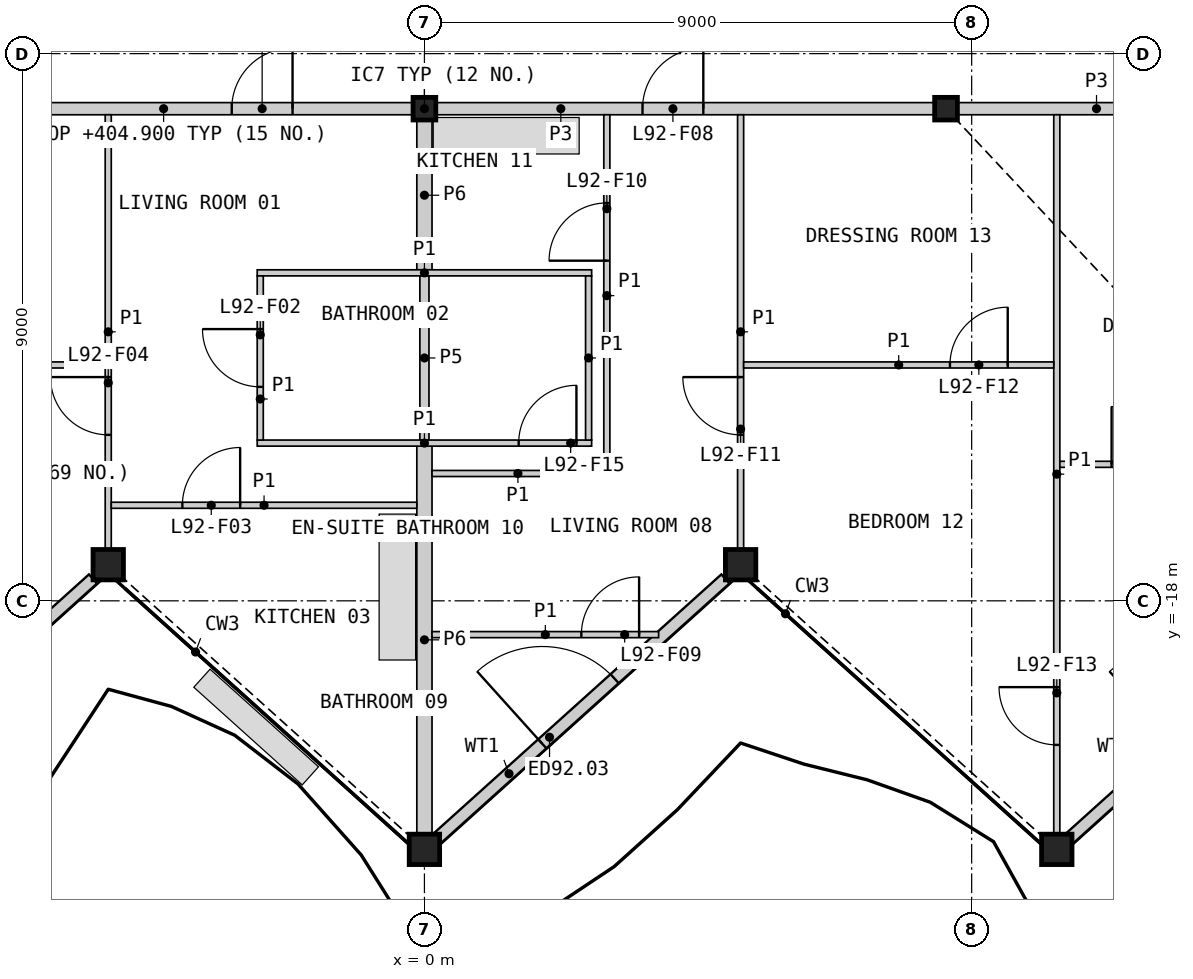
"""IFC4 building model, lengths in metres.
Left out: names, types, materials, properties, quantities, classifications, styles, units other than length and angle.
Written with IfcOpenShell. Run it as: python <this file> out.ifc"""

import sys

from ifc_helpers import new_model, si_unit, direction, frame, frame_2d, origin, origin_2d, place, context, subcontext, project, spatial, rectangle, hollow_rectangle, i_section, extrude, element, fill, save


model = new_model("IFC4")
c1 = context("Model", 3, precision=1e-05, world=origin(), true_north=direction((0.0, 1.0)))
c2 = subcontext(c1, "Body", "Model", "MODEL_VIEW")
j1 = project(units=[si_unit("LENGTHUNIT", "METRE"), si_unit("PLANEANGLEUNIT", "RADIAN")], contexts=[c1])
p1 = place(None, origin())
s1 = spatial("IfcSite", under=j1, at=p1, CompositionType="ELEMENT")
p2 = place(p1, origin())
s2 = spatial("IfcBuilding", under=s1, at=p2, CompositionType="ELEMENT")
p3 = place(p2, frame((0.0, 0.0, 401.8)))
s3 = spatial("IfcBuildingStorey", under=s2, at=p3, CompositionType="ELEMENT", Elevation=401.8)
for number, where, z_axis, x_axis in (
    (1, (-5.2, -17.406, 0.0), (0.0, 0.0, 1.0), (1.0, 0.0, 0.0)),
    (2, (0.0, -22.088, 0.0), (0.0, 0.0, 1.0), (1.0, 0.0, 0.0)),
    (3, (5.2, -17.406, 0.0), (0.0, 0.0, 1.0), (1.0, 0.0, 0.0)),
    (4, (10.4, -22.088, 0.0), (0.0, 0.0, 1.0), (1.0, 0.0, 0.0)),
):
    element("IfcColumn", number, at=place(p3, frame(where, z_axis=z_axis, x_axis=x_axis)), inside=s3, PredefinedType="COLUMN", context=c2, shape_type="SweptSolid", body=[
        extrude(hollow_rectangle(XDim=0.5, YDim=0.5, WallThickness=0.03, at=origin_2d()), origin(), (0.0, 0.0, 1.0), 3.4),
    ])
for number, where, z_axis, x_axis in (
    (5, (0.0, -9.906, 0.0), (0.0, 0.0, 1.0), (1.0, 0.0, 0.0)),
    (6, (8.578, -9.906, 0.0), (0.0, 0.0, 1.0), (1.0, 0.0, 0.0)),
):
    element("IfcColumn", number, at=place(p3, frame(where, z_axis=z_axis, x_axis=x_axis)), inside=s3, PredefinedType="COLUMN", context=c2, shape_type="SweptSolid", body=[
        extrude(i_section(OverallWidth=0.374, OverallDepth=0.372, WebThickness=0.016, FlangeThickness=0.026, at=origin_2d()), origin(), (0.0, 0.0, 1.0), 3.4),
    ])
p4 = place(p3, frame((-10.195, -21.912, 0.0), z_axis=(0.0, 0.0, 1.0), x_axis=(0.743132515916, 0.669144277259, 0.0)))
e7 = element("IfcWall", 7, at=p4, inside=s3, PredefinedType="SOLIDWALL", context=c2, shape_type="SweptSolid", body=[
    extrude(rectangle(XDim=6.385, YDim=0.2, at=frame_2d((3.192, 0.0))), origin(), (0.0, 0.0, 1.0), 2.634),
])
p5 = place(p4, frame((2.333, 0.0, 0.0)))
e8 = element("IfcOpeningElement", 8, at=p5, cuts=e7, PredefinedType="OPENING", context=c2, shape_type="SweptSolid", body=[
    extrude(rectangle(XDim=1.6, YDim=2.25, at=frame_2d((0.8, 1.125))), frame((0.0, 0.11, 0.0), z_axis=(0.0, -1.0, 0.0), x_axis=(1.0, 0.0, 0.0)), (0.0, 0.0, 1.0), 0.22),
])
p6 = place(p3, frame((0.205, -21.912, 0.0), z_axis=(0.0, 0.0, 1.0), x_axis=(0.743132515916, 0.669144277259, 0.0)))
e9 = element("IfcWall", 9, at=p6, inside=s3, PredefinedType="SOLIDWALL", context=c2, shape_type="SweptSolid", body=[
    extrude(rectangle(XDim=6.385, YDim=0.2, at=frame_2d((3.192, 0.0))), origin(), (0.0, 0.0, 1.0), 2.634),
])
p7 = place(p6, frame((2.333, 0.0, 0.0)))
e10 = element("IfcOpeningElement", 10, at=p7, cuts=e9, PredefinedType="OPENING", context=c2, shape_type="SweptSolid", body=[
    extrude(rectangle(XDim=1.6, YDim=2.25, at=frame_2d((0.8, 1.125))), frame((0.0, 0.11, 0.0), z_axis=(0.0, -1.0, 0.0), x_axis=(1.0, 0.0, 0.0)), (0.0, 0.0, 1.0), 0.22),
])
p8 = place(p3, frame((10.605, -21.912, 0.0), z_axis=(0.0, 0.0, 1.0), x_axis=(0.743149635876, 0.669125263831, 0.0)))
e11 = element("IfcWall", 11, at=p8, inside=s3, PredefinedType="SOLIDWALL", context=c2, shape_type="SweptSolid", body=[
    extrude(rectangle(XDim=6.385, YDim=0.2, at=frame_2d((3.193, 0.0))), origin(), (0.0, 0.0, 1.0), 2.634),
])
p9 = place(p8, frame((2.333, 0.0, 0.0)))
e12 = element("IfcOpeningElement", 12, at=p9, cuts=e11, PredefinedType="OPENING", context=c2, shape_type="SweptSolid", body=[
    extrude(rectangle(XDim=1.6, YDim=2.25, at=frame_2d((0.8, 1.125))), frame((0.0, 0.11, 0.0), z_axis=(0.0, -1.0, 0.0), x_axis=(1.0, 0.0, 0.0)), (0.0, 0.0, 1.0), 0.22),
])
p10 = place(p3, frame((-8.382, -9.906, 0.0), z_axis=(0.0, 0.0, 1.0), x_axis=(1.0, 0.0, 0.0)))
e13 = element("IfcWall", 13, at=p10, inside=s3, PredefinedType="PARTITIONING", context=c2, shape_type="SweptSolid", body=[
    extrude(rectangle(XDim=8.185, YDim=0.2, at=frame_2d((4.092, 0.0))), origin(), (0.0, 0.0, 1.0), 3.1),
])
p11 = place(p10, frame((5.213, 0.0, 0.0)))
e14 = element("IfcOpeningElement", 14, at=p11, cuts=e13, PredefinedType="OPENING", context=c2, shape_type="SweptSolid", body=[
    extrude(rectangle(XDim=1.0, YDim=2.1, at=frame_2d((0.5, 1.05))), frame((0.0, 0.11, 0.0), z_axis=(0.0, -1.0, 0.0), x_axis=(1.0, 0.0, 0.0)), (0.0, 0.0, 1.0), 0.22),
])
p12 = place(p3, frame((0.197, -9.906, 0.0), z_axis=(0.0, 0.0, 1.0), x_axis=(1.0, 0.0, 0.0)))
e15 = element("IfcWall", 15, at=p12, inside=s3, PredefinedType="PARTITIONING", context=c2, shape_type="SweptSolid", body=[
    extrude(rectangle(XDim=8.185, YDim=0.2, at=frame_2d((4.092, 0.0))), origin(), (0.0, 0.0, 1.0), 3.1),
])
p13 = place(p12, frame((3.39, 0.0, 0.0)))
e16 = element("IfcOpeningElement", 16, at=p13, cuts=e15, PredefinedType="OPENING", context=c2, shape_type="SweptSolid", body=[
    extrude(rectangle(XDim=1.0, YDim=2.1, at=frame_2d((0.5, 1.05))), frame((0.0, 0.11, 0.0), z_axis=(0.0, -1.0, 0.0), x_axis=(1.0, 0.0, 0.0)), (0.0, 0.0, 1.0), 0.22),
])
p14 = place(p3, frame((0.0, -21.828, 0.0), z_axis=(0.0, 0.0, 1.0), x_axis=(0.0, 1.0, 0.0)))
e17 = element("IfcWall", 17, at=p14, inside=s3, PredefinedType="PARTITIONING", context=c2, shape_type="SweptSolid", body=[
    extrude(rectangle(XDim=6.372, YDim=0.25, at=frame_2d((3.186, 0.0))), origin(), (0.0, 0.0, 1.0), 2.33),
])
p15 = place(p3, frame((8.775, -9.906, 0.0), z_axis=(0.0, 0.0, 1.0), x_axis=(1.0, 0.0, 0.0)))
e18 = element("IfcWall", 18, at=p15, inside=s3, PredefinedType="PARTITIONING", context=c2, shape_type="SweptSolid", body=[
    extrude(rectangle(XDim=4.555, YDim=0.2, at=frame_2d((2.278, 0.0))), origin(), (0.0, 0.0, 1.0), 3.1),
])
p16 = place(p3, frame((0.0, -12.556, 0.0), z_axis=(0.0, 0.0, 1.0), x_axis=(0.0, 1.0, 0.0)))
e19 = element("IfcWall", 19, at=p16, inside=s3, PredefinedType="PARTITIONING", context=c2, shape_type="SweptSolid", body=[
    extrude(rectangle(XDim=2.453, YDim=0.25, at=frame_2d((1.227, 0.0))), origin(), (0.0, 0.0, 1.0), 2.33),
])
p17 = place(p3, frame((0.0, -15.356, 0.0), z_axis=(0.0, 0.0, 1.0), x_axis=(0.0, 1.0, 0.0)))
e20 = element("IfcWall", 20, at=p17, inside=s3, PredefinedType="PLUMBINGWALL", context=c2, shape_type="SweptSolid", body=[
    extrude(rectangle(XDim=2.7, YDim=0.15, at=frame_2d((1.35, 0.0))), origin(), (0.0, 0.0, 1.0), 2.33),
])
p18 = place(p3, frame((10.4, -21.828, 0.0), z_axis=(0.0, 0.0, 1.0), x_axis=(0.0, 1.0, 0.0)))
e21 = element("IfcWall", 21, at=p18, inside=s3, PredefinedType="PARTITIONING", context=c2, shape_type="SweptSolid", body=[
    extrude(rectangle(XDim=11.822, YDim=0.1, at=frame_2d((5.911, 0.0))), origin(), (0.0, 0.0, 1.0), 2.33),
])
p19 = place(p18, frame((1.458, 0.0, 0.0)))
e22 = element("IfcOpeningElement", 22, at=p19, cuts=e21, PredefinedType="OPENING", context=c2, shape_type="SweptSolid", body=[
    extrude(rectangle(XDim=0.95, YDim=2.1, at=frame_2d((0.475, 1.05))), frame((0.0, 0.06, 0.0), z_axis=(0.0, -1.0, 0.0), x_axis=(1.0, 0.0, 0.0)), (0.0, 0.0, 1.0), 0.12),
])
p20 = place(p3, frame((-5.2, -17.146, 0.0), z_axis=(0.0, 0.0, 1.0), x_axis=(0.0, 1.0, 0.0)))
e23 = element("IfcWall", 23, at=p20, inside=s3, PredefinedType="PARTITIONING", context=c2, shape_type="SweptSolid", body=[
    extrude(rectangle(XDim=7.14, YDim=0.1, at=frame_2d((3.57, 0.0))), origin(), (0.0, 0.0, 1.0), 2.33),
])
p21 = place(p20, frame((1.876, 0.0, 0.0)))
e24 = element("IfcOpeningElement", 24, at=p21, cuts=e23, PredefinedType="OPENING", context=c2, shape_type="SweptSolid", body=[
    extrude(rectangle(XDim=0.95, YDim=2.1, at=frame_2d((0.475, 1.05))), frame((0.0, 0.06, 0.0), z_axis=(0.0, -1.0, 0.0), x_axis=(1.0, 0.0, 0.0)), (0.0, 0.0, 1.0), 0.12),
])
p22 = place(p3, frame((5.2, -17.146, 0.0), z_axis=(0.0, 0.0, 1.0), x_axis=(0.0, 1.0, 0.0)))
e25 = element("IfcWall", 25, at=p22, inside=s3, PredefinedType="PARTITIONING", context=c2, shape_type="SweptSolid", body=[
    extrude(rectangle(XDim=7.14, YDim=0.1, at=frame_2d((3.57, 0.0))), origin(), (0.0, 0.0, 1.0), 2.33),
])
p23 = place(p22, frame((1.876, 0.0, 0.0)))
e26 = element("IfcOpeningElement", 26, at=p23, cuts=e25, PredefinedType="OPENING", context=c2, shape_type="SweptSolid", body=[
    extrude(rectangle(XDim=0.95, YDim=2.1, at=frame_2d((0.475, 1.05))), frame((0.0, 0.06, 0.0), z_axis=(0.0, -1.0, 0.0), x_axis=(1.0, 0.0, 0.0)), (0.0, 0.0, 1.0), 0.12),
])
p24 = place(p3, frame((10.45, -15.755, 0.0), z_axis=(0.0, 0.0, 1.0), x_axis=(1.0, 0.0, 0.0)))
e27 = element("IfcWall", 27, at=p24, inside=s3, PredefinedType="PARTITIONING", context=c2, shape_type="SweptSolid", body=[
    extrude(rectangle(XDim=6.158, YDim=0.1, at=frame_2d((3.079, 0.0))), origin(), (0.0, 0.0, 1.0), 2.33),
])
p25 = place(p24, frame((0.851, 0.0, 0.0)))
e28 = element("IfcOpeningElement", 28, at=p25, cuts=e27, PredefinedType="OPENING", context=c2, shape_type="SweptSolid", body=[
    extrude(rectangle(XDim=0.95, YDim=2.1, at=frame_2d((0.475, 1.05))), frame((0.0, 0.06, 0.0), z_axis=(0.0, -1.0, 0.0), x_axis=(1.0, 0.0, 0.0)), (0.0, 0.0, 1.0), 0.12),
])
p26 = place(p3, frame((3.0, -15.956, 0.0), z_axis=(0.0, 0.0, 1.0), x_axis=(0.0, 1.0, 0.0)))
e29 = element("IfcWall", 29, at=p26, inside=s3, PredefinedType="PARTITIONING", context=c2, shape_type="SweptSolid", body=[
    extrude(rectangle(XDim=5.95, YDim=0.1, at=frame_2d((2.975, 0.0))), origin(), (0.0, 0.0, 1.0), 2.33),
])
p27 = place(p26, frame((3.55, 0.0, 0.0)))
e30 = element("IfcOpeningElement", 30, at=p27, cuts=e29, PredefinedType="OPENING", context=c2, shape_type="SweptSolid", body=[
    extrude(rectangle(XDim=0.95, YDim=2.1, at=frame_2d((0.475, 1.05))), frame((0.0, 0.06, 0.0), z_axis=(0.0, -1.0, 0.0), x_axis=(1.0, 0.0, 0.0)), (0.0, 0.0, 1.0), 0.12),
])
p28 = place(p3, frame((-2.75, -12.606, 0.0), z_axis=(0.0, 0.0, 1.0), x_axis=(1.0, 0.0, 0.0)))
e31 = element("IfcWall", 31, at=p28, inside=s3, PredefinedType="PARTITIONING", context=c2, shape_type="SweptSolid", body=[
    extrude(rectangle(XDim=5.5, YDim=0.1, at=frame_2d((2.75, 0.0))), origin(), (0.0, 0.0, 1.0), 2.33),
])
p29 = place(p3, frame((-2.75, -15.406, 0.0), z_axis=(0.0, 0.0, 1.0), x_axis=(1.0, 0.0, 0.0)))
e32 = element("IfcWall", 32, at=p29, inside=s3, PredefinedType="PARTITIONING", context=c2, shape_type="SweptSolid", body=[
    extrude(rectangle(XDim=5.5, YDim=0.1, at=frame_2d((2.75, 0.0))), origin(), (0.0, 0.0, 1.0), 2.33),
])
p30 = place(p29, frame((4.3, 0.0, 0.0)))
e33 = element("IfcOpeningElement", 33, at=p30, cuts=e32, PredefinedType="OPENING", context=c2, shape_type="SweptSolid", body=[
    extrude(rectangle(XDim=0.95, YDim=2.1, at=frame_2d((0.475, 1.05))), frame((0.0, 0.06, 0.0), z_axis=(0.0, -1.0, 0.0), x_axis=(1.0, 0.0, 0.0)), (0.0, 0.0, 1.0), 0.12),
])
p31 = place(p3, frame((-5.15, -16.428, 0.0), z_axis=(0.0, 0.0, 1.0), x_axis=(1.0, 0.0, 0.0)))
e34 = element("IfcWall", 34, at=p31, inside=s3, PredefinedType="PARTITIONING", context=c2, shape_type="SweptSolid", body=[
    extrude(rectangle(XDim=5.025, YDim=0.1, at=frame_2d((2.512, 0.0))), origin(), (0.0, 0.0, 1.0), 2.33),
])
p32 = place(p31, frame((1.169, 0.0, 0.0)))
e35 = element("IfcOpeningElement", 35, at=p32, cuts=e34, PredefinedType="OPENING", context=c2, shape_type="SweptSolid", body=[
    extrude(rectangle(XDim=0.95, YDim=2.1, at=frame_2d((0.475, 1.05))), frame((0.0, 0.06, 0.0), z_axis=(0.0, -1.0, 0.0), x_axis=(1.0, 0.0, 0.0)), (0.0, 0.0, 1.0), 0.12),
])
p33 = place(p3, frame((-10.35, -14.121, 0.0), z_axis=(0.0, 0.0, 1.0), x_axis=(1.0, 0.0, 0.0)))
e36 = element("IfcWall", 36, at=p33, inside=s3, PredefinedType="PARTITIONING", context=c2, shape_type="SweptSolid", body=[
    extrude(rectangle(XDim=5.1, YDim=0.1, at=frame_2d((2.55, 0.0))), origin(), (0.0, 0.0, 1.0), 2.33),
])
p34 = place(p33, frame((0.757, 0.0, 0.0)))
e37 = element("IfcOpeningElement", 37, at=p34, cuts=e36, PredefinedType="OPENING", context=c2, shape_type="SweptSolid", body=[
    extrude(rectangle(XDim=0.95, YDim=2.1, at=frame_2d((0.475, 1.05))), frame((0.0, 0.06, 0.0), z_axis=(0.0, -1.0, 0.0), x_axis=(1.0, 0.0, 0.0)), (0.0, 0.0, 1.0), 0.12),
])
p35 = place(p3, frame((5.25, -14.121, 0.0), z_axis=(0.0, 0.0, 1.0), x_axis=(1.0, 0.0, 0.0)))
e38 = element("IfcWall", 38, at=p35, inside=s3, PredefinedType="PARTITIONING", context=c2, shape_type="SweptSolid", body=[
    extrude(rectangle(XDim=5.1, YDim=0.1, at=frame_2d((2.55, 0.0))), origin(), (0.0, 0.0, 1.0), 2.33),
])
p36 = place(p35, frame((3.393, 0.0, 0.0)))
e39 = element("IfcOpeningElement", 39, at=p36, cuts=e38, PredefinedType="OPENING", context=c2, shape_type="SweptSolid", body=[
    extrude(rectangle(XDim=0.95, YDim=2.1, at=frame_2d((0.475, 1.05))), frame((0.0, 0.06, 0.0), z_axis=(0.0, -1.0, 0.0), x_axis=(1.0, 0.0, 0.0)), (0.0, 0.0, 1.0), 0.12),
])
p37 = place(p3, frame((0.125, -18.556, 0.0), z_axis=(0.0, 0.0, 1.0), x_axis=(1.0, 0.0, 0.0)))
e40 = element("IfcWall", 40, at=p37, inside=s3, PredefinedType="PARTITIONING", context=c2, shape_type="SweptSolid", body=[
    extrude(rectangle(XDim=3.727, YDim=0.1, at=frame_2d((1.863, 0.0))), origin(), (0.0, 0.0, 1.0), 2.33),
])
p38 = place(p37, frame((2.456, 0.0, 0.0)))
e41 = element("IfcOpeningElement", 41, at=p38, cuts=e40, PredefinedType="OPENING", context=c2, shape_type="SweptSolid", body=[
    extrude(rectangle(XDim=0.95, YDim=2.1, at=frame_2d((0.475, 1.05))), frame((0.0, 0.06, 0.0), z_axis=(0.0, -1.0, 0.0), x_axis=(1.0, 0.0, 0.0)), (0.0, 0.0, 1.0), 0.12),
])
p39 = place(p3, frame((0.125, -15.906, 0.0), z_axis=(0.0, 0.0, 1.0), x_axis=(1.0, 0.0, 0.0)))
e42 = element("IfcWall", 42, at=p39, inside=s3, PredefinedType="PARTITIONING", context=c2, shape_type="SweptSolid", body=[
    extrude(rectangle(XDim=2.825, YDim=0.1, at=frame_2d((1.413, 0.0))), origin(), (0.0, 0.0, 1.0), 2.33),
])
p40 = place(p3, frame((-2.7, -15.356, 0.0), z_axis=(0.0, 0.0, 1.0), x_axis=(0.0, 1.0, 0.0)))
e43 = element("IfcWall", 43, at=p40, inside=s3, PredefinedType="PARTITIONING", context=c2, shape_type="SweptSolid", body=[
    extrude(rectangle(XDim=2.7, YDim=0.1, at=frame_2d((1.35, 0.0))), origin(), (0.0, 0.0, 1.0), 2.33),
])
p41 = place(p40, frame((0.875, 0.0, 0.0)))
e44 = element("IfcOpeningElement", 44, at=p41, cuts=e43, PredefinedType="OPENING", context=c2, shape_type="SweptSolid", body=[
    extrude(rectangle(XDim=0.95, YDim=2.1, at=frame_2d((0.475, 1.05))), frame((0.0, 0.06, 0.0), z_axis=(0.0, -1.0, 0.0), x_axis=(1.0, 0.0, 0.0)), (0.0, 0.0, 1.0), 0.12),
])
p42 = place(p3, frame((2.7, -15.356, 0.0), z_axis=(0.0, 0.0, 1.0), x_axis=(0.0, 1.0, 0.0)))
e45 = element("IfcWall", 45, at=p42, inside=s3, PredefinedType="PARTITIONING", context=c2, shape_type="SweptSolid", body=[
    extrude(rectangle(XDim=2.7, YDim=0.1, at=frame_2d((1.35, 0.0))), origin(), (0.0, 0.0, 1.0), 2.33),
])
p43 = place(p7, origin())
e46 = element("IfcDoor", 46, at=p43, inside=s3, OperationType="DOUBLE_DOOR_SINGLE_SWING", PredefinedType="DOOR", context=c2, shape_type="SweptSolid", body=[
    extrude(rectangle(XDim=1.6, YDim=2.25, at=frame_2d((0.8, 1.125))), frame((0.0, 0.025, 0.0), z_axis=(0.0, -1.0, 0.0), x_axis=(1.0, 0.0, 0.0)), (0.0, 0.0, 1.0), 0.05),
])
fill(e10, e46)
p44 = place(p11, origin())
e47 = element("IfcDoor", 47, at=p44, inside=s3, OperationType="SINGLE_SWING_RIGHT", PredefinedType="DOOR", context=c2, shape_type="SweptSolid", body=[
    extrude(rectangle(XDim=1.0, YDim=2.1, at=frame_2d((0.5, 1.05))), frame((0.0, 0.025, 0.0), z_axis=(0.0, -1.0, 0.0), x_axis=(1.0, 0.0, 0.0)), (0.0, 0.0, 1.0), 0.05),
])
fill(e14, e47)
p45 = place(p41, origin())
e48 = element("IfcDoor", 48, at=p45, inside=s3, OperationType="SINGLE_SWING_RIGHT", PredefinedType="DOOR", context=c2, shape_type="SweptSolid", body=[
    extrude(rectangle(XDim=0.95, YDim=2.1, at=frame_2d((0.475, 1.05))), frame((0.0, 0.025, 0.0), z_axis=(0.0, -1.0, 0.0), x_axis=(1.0, 0.0, 0.0)), (0.0, 0.0, 1.0), 0.05),
])
fill(e44, e48)
p46 = place(p32, origin())
e49 = element("IfcDoor", 49, at=p46, inside=s3, OperationType="SINGLE_SWING_RIGHT", PredefinedType="DOOR", context=c2, shape_type="SweptSolid", body=[
    extrude(rectangle(XDim=0.95, YDim=2.1, at=frame_2d((0.475, 1.05))), frame((0.0, 0.025, 0.0), z_axis=(0.0, -1.0, 0.0), x_axis=(1.0, 0.0, 0.0)), (0.0, 0.0, 1.0), 0.05),
])
fill(e35, e49)
p47 = place(p21, origin())
e50 = element("IfcDoor", 50, at=p47, inside=s3, OperationType="SINGLE_SWING_RIGHT", PredefinedType="DOOR", context=c2, shape_type="SweptSolid", body=[
    extrude(rectangle(XDim=0.95, YDim=2.1, at=frame_2d((0.475, 1.05))), frame((0.0, 0.025, 0.0), z_axis=(0.0, -1.0, 0.0), x_axis=(1.0, 0.0, 0.0)), (0.0, 0.0, 1.0), 0.05),
])
fill(e24, e50)
p48 = place(p13, origin())
e51 = element("IfcDoor", 51, at=p48, inside=s3, OperationType="SINGLE_SWING_RIGHT", PredefinedType="DOOR", context=c2, shape_type="SweptSolid", body=[
    extrude(rectangle(XDim=1.0, YDim=2.1, at=frame_2d((0.5, 1.05))), frame((0.0, 0.025, 0.0), z_axis=(0.0, -1.0, 0.0), x_axis=(1.0, 0.0, 0.0)), (0.0, 0.0, 1.0), 0.05),
])
fill(e16, e51)
p49 = place(p38, origin())
e52 = element("IfcDoor", 52, at=p49, inside=s3, OperationType="SINGLE_SWING_RIGHT", PredefinedType="DOOR", context=c2, shape_type="SweptSolid", body=[
    extrude(rectangle(XDim=0.95, YDim=2.1, at=frame_2d((0.475, 1.05))), frame((0.0, 0.025, 0.0), z_axis=(0.0, -1.0, 0.0), x_axis=(1.0, 0.0, 0.0)), (0.0, 0.0, 1.0), 0.05),
])
fill(e41, e52)
p50 = place(p27, origin())
e53 = element("IfcDoor", 53, at=p50, inside=s3, OperationType="SINGLE_SWING_LEFT", PredefinedType="DOOR", context=c2, shape_type="SweptSolid", body=[
    extrude(rectangle(XDim=0.95, YDim=2.1, at=frame_2d((0.475, 1.05))), frame((0.0, 0.025, 0.0), z_axis=(0.0, -1.0, 0.0), x_axis=(1.0, 0.0, 0.0)), (0.0, 0.0, 1.0), 0.05),
])
fill(e30, e53)
p51 = place(p23, origin())
e54 = element("IfcDoor", 54, at=p51, inside=s3, OperationType="SINGLE_SWING_RIGHT", PredefinedType="DOOR", context=c2, shape_type="SweptSolid", body=[
    extrude(rectangle(XDim=0.95, YDim=2.1, at=frame_2d((0.475, 1.05))), frame((0.0, 0.025, 0.0), z_axis=(0.0, -1.0, 0.0), x_axis=(1.0, 0.0, 0.0)), (0.0, 0.0, 1.0), 0.05),
])
fill(e26, e54)
p52 = place(p36, origin())
e55 = element("IfcDoor", 55, at=p52, inside=s3, OperationType="SINGLE_SWING_RIGHT", PredefinedType="DOOR", context=c2, shape_type="SweptSolid", body=[
    extrude(rectangle(XDim=0.95, YDim=2.1, at=frame_2d((0.475, 1.05))), frame((0.0, 0.025, 0.0), z_axis=(0.0, -1.0, 0.0), x_axis=(1.0, 0.0, 0.0)), (0.0, 0.0, 1.0), 0.05),
])
fill(e39, e55)
p53 = place(p19, origin())
e56 = element("IfcDoor", 56, at=p53, inside=s3, OperationType="SINGLE_SWING_RIGHT", PredefinedType="DOOR", context=c2, shape_type="SweptSolid", body=[
    extrude(rectangle(XDim=0.95, YDim=2.1, at=frame_2d((0.475, 1.05))), frame((0.0, 0.025, 0.0), z_axis=(0.0, -1.0, 0.0), x_axis=(1.0, 0.0, 0.0)), (0.0, 0.0, 1.0), 0.05),
])
fill(e22, e56)
p54 = place(p25, origin())
e57 = element("IfcDoor", 57, at=p54, inside=s3, OperationType="SINGLE_SWING_LEFT", PredefinedType="DOOR", context=c2, shape_type="SweptSolid", body=[
    extrude(rectangle(XDim=0.95, YDim=2.1, at=frame_2d((0.475, 1.05))), frame((0.0, 0.025, 0.0), z_axis=(0.0, -1.0, 0.0), x_axis=(1.0, 0.0, 0.0)), (0.0, 0.0, 1.0), 0.05),
])
fill(e28, e57)
p55 = place(p30, origin())
e58 = element("IfcDoor", 58, at=p55, inside=s3, OperationType="SINGLE_SWING_RIGHT", PredefinedType="DOOR", context=c2, shape_type="SweptSolid", body=[
    extrude(rectangle(XDim=0.95, YDim=2.1, at=frame_2d((0.475, 1.05))), frame((0.0, 0.025, 0.0), z_axis=(0.0, -1.0, 0.0), x_axis=(1.0, 0.0, 0.0)), (0.0, 0.0, 1.0), 0.05),
])
fill(e33, e58)
save(model, sys.argv[1])
